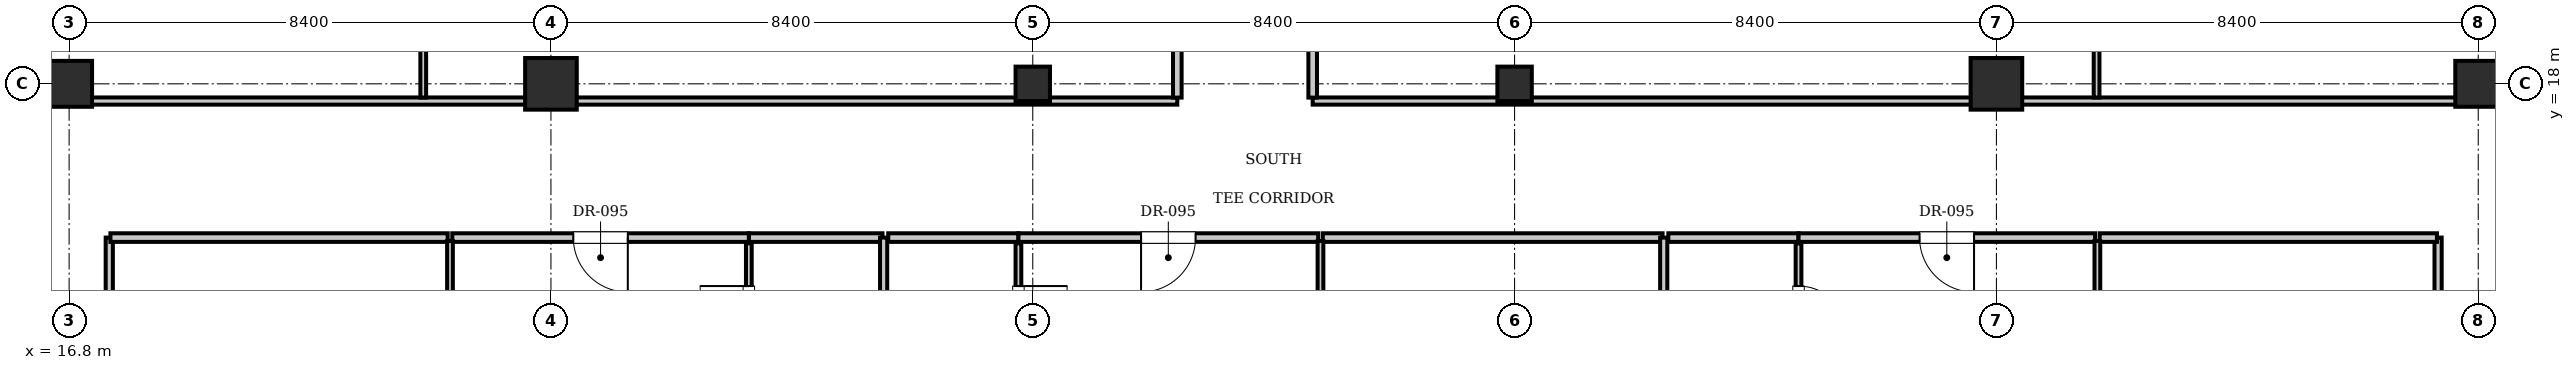
"""IFC4 building model, lengths in metres.
Left out: names, types, materials, properties, quantities, classifications, styles, units other than length and angle.
Written with IfcOpenShell. Run it as: python <this file> out.ifc"""

import sys

from ifc_helpers import new_model, si_unit, direction, frame, frame_2d, origin, origin_2d, place, context, subcontext, project, spatial, rectangle, i_section, extrude, element, fill, save


model = new_model("IFC4")
c1 = context("Model", 3, precision=1e-05, world=origin(), true_north=direction((0.0, 1.0)))
c2 = subcontext(c1, "Body", "Model", "MODEL_VIEW")
j1 = project(units=[si_unit("LENGTHUNIT", "METRE"), si_unit("PLANEANGLEUNIT", "RADIAN")], contexts=[c1])
p1 = place(None, origin())
s1 = spatial("IfcSite", under=j1, at=p1, CompositionType="ELEMENT")
p2 = place(p1, origin())
s2 = spatial("IfcBuilding", under=s1, at=p2, CompositionType="ELEMENT")
p3 = place(p2, frame((0.0, 0.0, 162.05)))
s3 = spatial("IfcBuildingStorey", under=s2, at=p3, CompositionType="ELEMENT", Elevation=162.05)
for number, where, z_axis, x_axis in (
    (1, (25.2, 18.0, 0.0), (0.0, 0.0, 1.0), (1.0, 0.0, 0.0)),
    (2, (50.4, 18.0, 0.0), (0.0, 0.0, 1.0), (1.0, 0.0, 0.0)),
):
    element("IfcColumn", number, at=place(p3, frame(where, z_axis=z_axis, x_axis=x_axis)), inside=s3, PredefinedType="COLUMN", context=c2, shape_type="SweptSolid", body=[
        extrude(rectangle(XDim=0.9, YDim=0.9, at=origin_2d()), origin(), (0.0, 0.0, 1.0), 3.85),
    ])
for number, where, z_axis, x_axis in (
    (3, (33.6, 18.0, 0.0), (0.0, 0.0, 1.0), (1.0, 0.0, 0.0)),
    (4, (42.0, 18.0, 0.0), (0.0, 0.0, 1.0), (1.0, 0.0, 0.0)),
):
    element("IfcColumn", number, at=place(p3, frame(where, z_axis=z_axis, x_axis=x_axis)), inside=s3, PredefinedType="COLUMN", context=c2, shape_type="SweptSolid", body=[
        extrude(i_section(OverallWidth=0.6, OverallDepth=0.6, WebThickness=0.025, FlangeThickness=0.038, at=origin_2d()), origin(), (0.0, 0.0, 1.0), 3.85),
    ])
for number, where, z_axis, x_axis in (
    (5, (16.8, 18.0, 0.0), (0.0, 0.0, 1.0), (1.0, 0.0, 0.0)),
    (6, (58.8, 18.0, 0.0), (0.0, 0.0, 1.0), (1.0, 0.0, 0.0)),
):
    element("IfcColumn", number, at=place(p3, frame(where, z_axis=z_axis, x_axis=x_axis)), inside=s3, PredefinedType="COLUMN", context=c2, shape_type="SweptSolid", body=[
        extrude(rectangle(XDim=0.8, YDim=0.8, at=origin_2d()), origin(), (0.0, 0.0, 1.0), 3.85),
    ])
for number, where, z_axis, x_axis in (
    (7, (17.5, 9.0, 0.0), (0.0, 0.0, 1.0), (0.0, 1.0, 0.0)),
    (8, (58.1, 9.0, 0.0), (0.0, 0.0, 1.0), (0.0, 1.0, 0.0)),
):
    element("IfcWall", number, at=place(p3, frame(where, z_axis=z_axis, x_axis=x_axis)), inside=s3, PredefinedType="PARTITIONING", context=c2, shape_type="SweptSolid", body=[
        extrude(rectangle(XDim=6.32, YDim=0.125, at=frame_2d((3.16, 0.0))), origin(), (0.0, 0.0, 1.0), 3.61),
    ])
p4 = place(p3, frame((28.65, 15.32, 0.0), z_axis=(0.0, 0.0, 1.0), x_axis=(1.0, 0.0, 0.0)))
e9 = element("IfcWall", 9, at=p4, inside=s3, PredefinedType="PARTITIONING", context=c2, shape_type="SweptSolid", body=[
    extrude(rectangle(XDim=2.33, YDim=0.15, at=frame_2d((1.165, 0.0))), origin(), (0.0, 0.0, 1.0), 3.61),
])
p5 = place(p3, frame((28.65, 12.88, 0.0), z_axis=(0.0, 0.0, 1.0), x_axis=(0.0, 1.0, 0.0)))
e10 = element("IfcWall", 10, at=p5, inside=s3, PredefinedType="PARTITIONING", context=c2, shape_type="SweptSolid", body=[
    extrude(rectangle(XDim=2.34, YDim=0.1, at=frame_2d((1.17, 0.0))), origin(), (0.0, 0.0, 1.0), 3.61),
])
p6 = place(p5, frame((0.745, 0.0, 0.0)))
e11 = element("IfcOpeningElement", 11, at=p6, cuts=e10, PredefinedType="OPENING", context=c2, shape_type="SweptSolid", body=[
    extrude(rectangle(XDim=0.85, YDim=2.1, at=frame_2d((0.425, 1.05))), frame((0.0, 0.06, 0.0), z_axis=(0.0, -1.0, 0.0), x_axis=(1.0, 0.0, 0.0)), (0.0, 0.0, 1.0), 0.12),
])
p7 = place(p3, frame((17.52, 15.32, 0.0), z_axis=(0.0, 0.0, 1.0), x_axis=(1.0, 0.0, 0.0)))
e12 = element("IfcWall", 12, at=p7, inside=s3, PredefinedType="PARTITIONING", context=c2, shape_type="SweptSolid", body=[
    extrude(rectangle(XDim=5.88, YDim=0.15, at=frame_2d((2.94, 0.0))), origin(), (0.0, 0.0, 1.0), 3.61),
])
p8 = place(p3, frame((23.48, 15.32, 0.0), z_axis=(0.0, 0.0, 1.0), x_axis=(1.0, 0.0, 0.0)))
e13 = element("IfcWall", 13, at=p8, inside=s3, PredefinedType="PARTITIONING", context=c2, shape_type="SweptSolid", body=[
    extrude(rectangle(XDim=5.17, YDim=0.15, at=frame_2d((2.585, 0.0))), origin(), (0.0, 0.0, 1.0), 3.61),
])
p9 = place(p8, frame((2.11, 0.0, 0.0)))
e14 = element("IfcOpeningElement", 14, at=p9, cuts=e13, PredefinedType="OPENING", context=c2, shape_type="SweptSolid", body=[
    extrude(rectangle(XDim=0.95, YDim=2.15, at=frame_2d((0.475, 1.075))), frame((0.0, 0.085, 0.0), z_axis=(0.0, -1.0, 0.0), x_axis=(1.0, 0.0, 0.0)), (0.0, 0.0, 1.0), 0.17),
])
p10 = place(p3, frame((23.44, 4.63, 0.0), z_axis=(0.0, 0.0, 1.0), x_axis=(0.0, 1.0, 0.0)))
e15 = element("IfcWall", 15, at=p10, inside=s3, PredefinedType="PARTITIONING", context=c2, shape_type="SweptSolid", body=[
    extrude(rectangle(XDim=10.63, YDim=0.1, at=frame_2d((5.315, 0.0))), origin(), (0.0, 0.0, 1.0), 3.61),
])
p11 = place(p10, frame((1.6, 0.0, 0.0)))
e16 = element("IfcOpeningElement", 16, at=p11, cuts=e15, PredefinedType="OPENING", context=c2, shape_type="SweptSolid", body=[
    extrude(rectangle(XDim=0.9, YDim=2.1, at=frame_2d((0.45, 1.05))), frame((0.0, 0.06, 0.0), z_axis=(0.0, -1.0, 0.0), x_axis=(1.0, 0.0, 0.0)), (0.0, 0.0, 1.0), 0.12),
])
p12 = place(p3, frame((31.0, 4.7, 0.0), z_axis=(0.0, 0.0, 1.0), x_axis=(0.0, 1.0, 0.0)))
e17 = element("IfcWall", 17, at=p12, inside=s3, PredefinedType="PARTITIONING", context=c2, shape_type="SweptSolid", body=[
    extrude(rectangle(XDim=10.62, YDim=0.125, at=frame_2d((5.31, 0.0))), origin(), (0.0, 0.0, 1.0), 3.61),
])
p13 = place(p3, frame((31.08, 15.32, 0.0), z_axis=(0.0, 0.0, 1.0), x_axis=(1.0, 0.0, 0.0)))
e18 = element("IfcWall", 18, at=p13, inside=s3, PredefinedType="PARTITIONING", context=c2, shape_type="SweptSolid", body=[
    extrude(rectangle(XDim=2.27, YDim=0.15, at=frame_2d((1.135, 0.0))), origin(), (0.0, 0.0, 1.0), 3.61),
])
p14 = place(p3, frame((33.35, 12.88, 0.0), z_axis=(0.0, 0.0, 1.0), x_axis=(0.0, 1.0, 0.0)))
e19 = element("IfcWall", 19, at=p14, inside=s3, PredefinedType="PARTITIONING", context=c2, shape_type="SweptSolid", body=[
    extrude(rectangle(XDim=2.34, YDim=0.1, at=frame_2d((1.17, 0.0))), origin(), (0.0, 0.0, 1.0), 3.61),
])
p15 = place(p14, frame((0.745, 0.0, 0.0)))
e20 = element("IfcOpeningElement", 20, at=p15, cuts=e19, PredefinedType="OPENING", context=c2, shape_type="SweptSolid", body=[
    extrude(rectangle(XDim=0.85, YDim=2.1, at=frame_2d((0.425, 1.05))), frame((0.0, 0.06, 0.0), z_axis=(0.0, -1.0, 0.0), x_axis=(1.0, 0.0, 0.0)), (0.0, 0.0, 1.0), 0.12),
])
p16 = place(p3, frame((33.35, 15.32, 0.0), z_axis=(0.0, 0.0, 1.0), x_axis=(1.0, 0.0, 0.0)))
e21 = element("IfcWall", 21, at=p16, inside=s3, PredefinedType="PARTITIONING", context=c2, shape_type="SweptSolid", body=[
    extrude(rectangle(XDim=5.226, YDim=0.15, at=frame_2d((2.613, 0.0))), origin(), (0.0, 0.0, 1.0), 3.61),
])
p17 = place(p16, frame((2.138, 0.0, 0.0)))
e22 = element("IfcOpeningElement", 22, at=p17, cuts=e21, PredefinedType="OPENING", context=c2, shape_type="SweptSolid", body=[
    extrude(rectangle(XDim=0.95, YDim=2.15, at=frame_2d((0.475, 1.075))), frame((0.0, 0.085, 0.0), z_axis=(0.0, -1.0, 0.0), x_axis=(1.0, 0.0, 0.0)), (0.0, 0.0, 1.0), 0.17),
])
p18 = place(p3, frame((38.656, 15.32, 0.0), z_axis=(0.0, 0.0, 1.0), x_axis=(1.0, 0.0, 0.0)))
e23 = element("IfcWall", 23, at=p18, inside=s3, PredefinedType="PARTITIONING", context=c2, shape_type="SweptSolid", body=[
    extrude(rectangle(XDim=5.924, YDim=0.15, at=frame_2d((2.962, 0.0))), origin(), (0.0, 0.0, 1.0), 3.61),
])
p19 = place(p3, frame((38.616, 4.63, 0.0), z_axis=(0.0, 0.0, 1.0), x_axis=(0.0, 1.0, 0.0)))
e24 = element("IfcWall", 24, at=p19, inside=s3, PredefinedType="PARTITIONING", context=c2, shape_type="SweptSolid", body=[
    extrude(rectangle(XDim=10.63, YDim=0.1, at=frame_2d((5.315, 0.0))), origin(), (0.0, 0.0, 1.0), 3.61),
])
p20 = place(p19, frame((1.6, 0.0, 0.0)))
e25 = element("IfcOpeningElement", 25, at=p20, cuts=e24, PredefinedType="OPENING", context=c2, shape_type="SweptSolid", body=[
    extrude(rectangle(XDim=0.9, YDim=2.1, at=frame_2d((0.45, 1.05))), frame((0.0, 0.06, 0.0), z_axis=(0.0, -1.0, 0.0), x_axis=(1.0, 0.0, 0.0)), (0.0, 0.0, 1.0), 0.12),
])
p21 = place(p3, frame((44.6, 4.7, 0.0), z_axis=(0.0, 0.0, 1.0), x_axis=(0.0, 1.0, 0.0)))
e26 = element("IfcWall", 26, at=p21, inside=s3, PredefinedType="PARTITIONING", context=c2, shape_type="SweptSolid", body=[
    extrude(rectangle(XDim=10.62, YDim=0.125, at=frame_2d((5.31, 0.0))), origin(), (0.0, 0.0, 1.0), 3.61),
])
p22 = place(p3, frame((44.68, 15.32, 0.0), z_axis=(0.0, 0.0, 1.0), x_axis=(1.0, 0.0, 0.0)))
e27 = element("IfcWall", 27, at=p22, inside=s3, PredefinedType="PARTITIONING", context=c2, shape_type="SweptSolid", body=[
    extrude(rectangle(XDim=2.27, YDim=0.15, at=frame_2d((1.135, 0.0))), origin(), (0.0, 0.0, 1.0), 3.61),
])
p23 = place(p3, frame((46.95, 12.88, 0.0), z_axis=(0.0, 0.0, 1.0), x_axis=(0.0, 1.0, 0.0)))
e28 = element("IfcWall", 28, at=p23, inside=s3, PredefinedType="PARTITIONING", context=c2, shape_type="SweptSolid", body=[
    extrude(rectangle(XDim=2.34, YDim=0.1, at=frame_2d((1.17, 0.0))), origin(), (0.0, 0.0, 1.0), 3.61),
])
p24 = place(p23, frame((0.745, 0.0, 0.0)))
e29 = element("IfcOpeningElement", 29, at=p24, cuts=e28, PredefinedType="OPENING", context=c2, shape_type="SweptSolid", body=[
    extrude(rectangle(XDim=0.85, YDim=2.1, at=frame_2d((0.425, 1.05))), frame((0.0, 0.06, 0.0), z_axis=(0.0, -1.0, 0.0), x_axis=(1.0, 0.0, 0.0)), (0.0, 0.0, 1.0), 0.12),
])
p25 = place(p3, frame((46.95, 15.32, 0.0), z_axis=(0.0, 0.0, 1.0), x_axis=(1.0, 0.0, 0.0)))
e30 = element("IfcWall", 30, at=p25, inside=s3, PredefinedType="PARTITIONING", context=c2, shape_type="SweptSolid", body=[
    extrude(rectangle(XDim=5.17, YDim=0.15, at=frame_2d((2.585, 0.0))), origin(), (0.0, 0.0, 1.0), 3.61),
])
p26 = place(p25, frame((2.11, 0.0, 0.0)))
e31 = element("IfcOpeningElement", 31, at=p26, cuts=e30, PredefinedType="OPENING", context=c2, shape_type="SweptSolid", body=[
    extrude(rectangle(XDim=0.95, YDim=2.15, at=frame_2d((0.475, 1.075))), frame((0.0, 0.085, 0.0), z_axis=(0.0, -1.0, 0.0), x_axis=(1.0, 0.0, 0.0)), (0.0, 0.0, 1.0), 0.17),
])
p27 = place(p3, frame((52.2, 15.32, 0.0), z_axis=(0.0, 0.0, 1.0), x_axis=(1.0, 0.0, 0.0)))
e32 = element("IfcWall", 32, at=p27, inside=s3, PredefinedType="PARTITIONING", context=c2, shape_type="SweptSolid", body=[
    extrude(rectangle(XDim=5.88, YDim=0.15, at=frame_2d((2.94, 0.0))), origin(), (0.0, 0.0, 1.0), 3.61),
])
p28 = place(p3, frame((52.16, 4.63, 0.0), z_axis=(0.0, 0.0, 1.0), x_axis=(0.0, 1.0, 0.0)))
e33 = element("IfcWall", 33, at=p28, inside=s3, PredefinedType="PARTITIONING", context=c2, shape_type="SweptSolid", body=[
    extrude(rectangle(XDim=10.63, YDim=0.1, at=frame_2d((5.315, 0.0))), origin(), (0.0, 0.0, 1.0), 3.61),
])
p29 = place(p28, frame((1.6, 0.0, 0.0)))
e34 = element("IfcOpeningElement", 34, at=p29, cuts=e33, PredefinedType="OPENING", context=c2, shape_type="SweptSolid", body=[
    extrude(rectangle(XDim=0.9, YDim=2.1, at=frame_2d((0.45, 1.05))), frame((0.0, 0.06, 0.0), z_axis=(0.0, -1.0, 0.0), x_axis=(1.0, 0.0, 0.0)), (0.0, 0.0, 1.0), 0.12),
])
p30 = place(p3, frame((13.2, 17.7, 0.0), z_axis=(0.0, 0.0, 1.0), x_axis=(1.0, 0.0, 0.0)))
e35 = element("IfcWall", 35, at=p30, inside=s3, PredefinedType="PARTITIONING", context=c2, shape_type="SweptSolid", body=[
    extrude(rectangle(XDim=22.92, YDim=0.125, at=frame_2d((11.46, 0.0))), origin(), (0.0, 0.0, 1.0), 3.61),
])
p31 = place(p3, frame((38.48, 17.7, 0.0), z_axis=(0.0, 0.0, 1.0), x_axis=(1.0, 0.0, 0.0)))
e36 = element("IfcWall", 36, at=p31, inside=s3, PredefinedType="PARTITIONING", context=c2, shape_type="SweptSolid", body=[
    extrude(rectangle(XDim=23.92, YDim=0.125, at=frame_2d((11.96, 0.0))), origin(), (0.0, 0.0, 1.0), 3.61),
])
p32 = place(p3, frame((36.12, 17.76, 0.0), z_axis=(0.0, 0.0, 1.0), x_axis=(0.0, 1.0, 0.0)))
e37 = element("IfcWall", 37, at=p32, inside=s3, PredefinedType="PARTITIONING", context=c2, shape_type="SweptSolid", body=[
    extrude(rectangle(XDim=4.24, YDim=0.15, at=frame_2d((2.12, 0.0))), origin(), (0.0, 0.0, 1.0), 3.61),
])
p33 = place(p32, frame((1.645, 0.0, 0.0)))
e38 = element("IfcOpeningElement", 38, at=p33, cuts=e37, PredefinedType="OPENING", context=c2, shape_type="SweptSolid", body=[
    extrude(rectangle(XDim=0.95, YDim=2.15, at=frame_2d((0.475, 1.075))), frame((0.0, 0.085, 0.0), z_axis=(0.0, -1.0, 0.0), x_axis=(1.0, 0.0, 0.0)), (0.0, 0.0, 1.0), 0.17),
])
p34 = place(p3, frame((22.974, 17.76, 0.0), z_axis=(0.0, 0.0, 1.0), x_axis=(0.0, 1.0, 0.0)))
e39 = element("IfcWall", 39, at=p34, inside=s3, PredefinedType="PARTITIONING", context=c2, shape_type="SweptSolid", body=[
    extrude(rectangle(XDim=6.53, YDim=0.1, at=frame_2d((3.265, 0.0))), origin(), (0.0, 0.0, 1.0), 3.61),
])
p35 = place(p34, frame((2.815, 0.0, 0.0)))
e40 = element("IfcOpeningElement", 40, at=p35, cuts=e39, PredefinedType="OPENING", context=c2, shape_type="SweptSolid", body=[
    extrude(rectangle(XDim=0.9, YDim=2.1, at=frame_2d((0.45, 1.05))), frame((0.0, 0.06, 0.0), z_axis=(0.0, -1.0, 0.0), x_axis=(1.0, 0.0, 0.0)), (0.0, 0.0, 1.0), 0.12),
])
p36 = place(p3, frame((38.48, 17.76, 0.0), z_axis=(0.0, 0.0, 1.0), x_axis=(0.0, 1.0, 0.0)))
e41 = element("IfcWall", 41, at=p36, inside=s3, PredefinedType="PARTITIONING", context=c2, shape_type="SweptSolid", body=[
    extrude(rectangle(XDim=4.24, YDim=0.15, at=frame_2d((2.12, 0.0))), origin(), (0.0, 0.0, 1.0), 3.61),
])
p37 = place(p36, frame((1.645, 0.0, 0.0)))
e42 = element("IfcOpeningElement", 42, at=p37, cuts=e41, PredefinedType="OPENING", context=c2, shape_type="SweptSolid", body=[
    extrude(rectangle(XDim=0.95, YDim=2.15, at=frame_2d((0.475, 1.075))), frame((0.0, 0.085, 0.0), z_axis=(0.0, -1.0, 0.0), x_axis=(1.0, 0.0, 0.0)), (0.0, 0.0, 1.0), 0.17),
])
p38 = place(p3, frame((52.146, 17.76, 0.0), z_axis=(0.0, 0.0, 1.0), x_axis=(0.0, 1.0, 0.0)))
e43 = element("IfcWall", 43, at=p38, inside=s3, PredefinedType="PARTITIONING", context=c2, shape_type="SweptSolid", body=[
    extrude(rectangle(XDim=6.53, YDim=0.1, at=frame_2d((3.265, 0.0))), origin(), (0.0, 0.0, 1.0), 3.61),
])
p39 = place(p38, frame((2.815, 0.0, 0.0)))
e44 = element("IfcOpeningElement", 44, at=p39, cuts=e43, PredefinedType="OPENING", context=c2, shape_type="SweptSolid", body=[
    extrude(rectangle(XDim=0.9, YDim=2.1, at=frame_2d((0.45, 1.05))), frame((0.0, 0.06, 0.0), z_axis=(0.0, -1.0, 0.0), x_axis=(1.0, 0.0, 0.0)), (0.0, 0.0, 1.0), 0.12),
])
p40 = place(p6, origin())
e45 = element("IfcDoor", 45, at=p40, inside=s3, OperationType="SINGLE_SWING_RIGHT", PredefinedType="DOOR", context=c2, shape_type="SweptSolid", body=[
    extrude(rectangle(XDim=0.85, YDim=2.1, at=frame_2d((0.425, 1.05))), frame((0.0, 0.025, 0.0), z_axis=(0.0, -1.0, 0.0), x_axis=(1.0, 0.0, 0.0)), (0.0, 0.0, 1.0), 0.05),
])
fill(e11, e45)
p41 = place(p9, frame((0.95, 0.0, 0.0), z_axis=(0.0, 0.0, 1.0), x_axis=(-1.0, 0.0, 0.0)))
e46 = element("IfcDoor", 46, at=p41, inside=s3, OperationType="SINGLE_SWING_LEFT", PredefinedType="DOOR", context=c2, shape_type="SweptSolid", body=[
    extrude(rectangle(XDim=0.95, YDim=2.15, at=frame_2d((0.475, 1.075))), frame((0.0, 0.025, 0.0), z_axis=(0.0, -1.0, 0.0), x_axis=(1.0, 0.0, 0.0)), (0.0, 0.0, 1.0), 0.05),
])
fill(e14, e46)
p42 = place(p15, frame((0.85, 0.0, 0.0), z_axis=(0.0, 0.0, 1.0), x_axis=(-1.0, 0.0, 0.0)))
e47 = element("IfcDoor", 47, at=p42, inside=s3, OperationType="SINGLE_SWING_LEFT", PredefinedType="DOOR", context=c2, shape_type="SweptSolid", body=[
    extrude(rectangle(XDim=0.85, YDim=2.1, at=frame_2d((0.425, 1.05))), frame((0.0, 0.025, 0.0), z_axis=(0.0, -1.0, 0.0), x_axis=(1.0, 0.0, 0.0)), (0.0, 0.0, 1.0), 0.05),
])
fill(e20, e47)
p43 = place(p17, frame((0.95, 0.0, 0.0), z_axis=(0.0, 0.0, 1.0), x_axis=(-1.0, 0.0, 0.0)))
e48 = element("IfcDoor", 48, at=p43, inside=s3, OperationType="SINGLE_SWING_RIGHT", PredefinedType="DOOR", context=c2, shape_type="SweptSolid", body=[
    extrude(rectangle(XDim=0.95, YDim=2.15, at=frame_2d((0.475, 1.075))), frame((0.0, 0.025, 0.0), z_axis=(0.0, -1.0, 0.0), x_axis=(1.0, 0.0, 0.0)), (0.0, 0.0, 1.0), 0.05),
])
fill(e22, e48)
p44 = place(p24, frame((0.85, 0.0, 0.0), z_axis=(0.0, 0.0, 1.0), x_axis=(-1.0, 0.0, 0.0)))
e49 = element("IfcDoor", 49, at=p44, inside=s3, OperationType="SINGLE_SWING_RIGHT", PredefinedType="DOOR", context=c2, shape_type="SweptSolid", body=[
    extrude(rectangle(XDim=0.85, YDim=2.1, at=frame_2d((0.425, 1.05))), frame((0.0, 0.025, 0.0), z_axis=(0.0, -1.0, 0.0), x_axis=(1.0, 0.0, 0.0)), (0.0, 0.0, 1.0), 0.05),
])
fill(e29, e49)
p45 = place(p26, frame((0.95, 0.0, 0.0), z_axis=(0.0, 0.0, 1.0), x_axis=(-1.0, 0.0, 0.0)))
e50 = element("IfcDoor", 50, at=p45, inside=s3, OperationType="SINGLE_SWING_LEFT", PredefinedType="DOOR", context=c2, shape_type="SweptSolid", body=[
    extrude(rectangle(XDim=0.95, YDim=2.15, at=frame_2d((0.475, 1.075))), frame((0.0, 0.025, 0.0), z_axis=(0.0, -1.0, 0.0), x_axis=(1.0, 0.0, 0.0)), (0.0, 0.0, 1.0), 0.05),
])
fill(e31, e50)
save(model, sys.argv[1])
